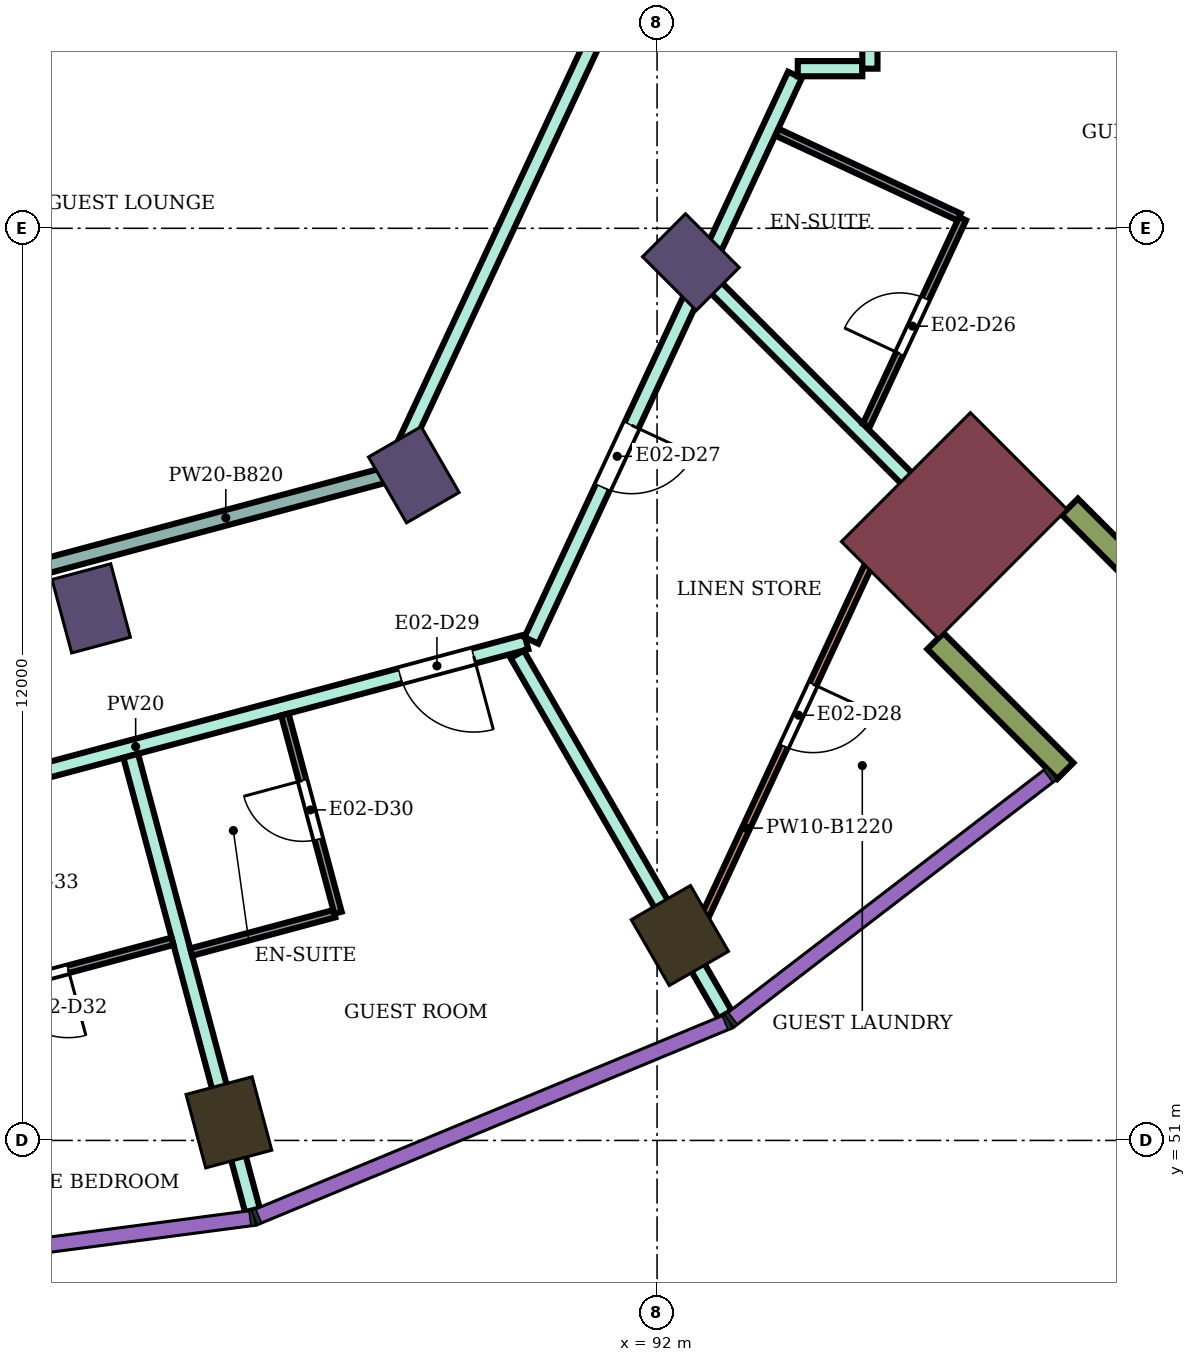
"""IFC4 building model, lengths in metres.
Left out: names, types, materials, properties, quantities, classifications, styles, units other than length and angle.
Written with IfcOpenShell. Run it as: python <this file> out.ifc"""

import sys

from ifc_helpers import new_model, si_unit, direction, frame, frame_2d, origin, origin_2d, place, context, subcontext, project, spatial, rectangle, extrude, element, fill, save


model = new_model("IFC4")
c1 = context("Model", 3, precision=1e-05, world=origin(), true_north=direction((0.0, 1.0)))
c2 = subcontext(c1, "Body", "Model", "MODEL_VIEW")
j1 = project(units=[si_unit("LENGTHUNIT", "METRE"), si_unit("PLANEANGLEUNIT", "RADIAN")], contexts=[c1])
p1 = place(None, origin())
s1 = spatial("IfcSite", under=j1, at=p1, CompositionType="ELEMENT")
p2 = place(p1, origin())
s2 = spatial("IfcBuilding", under=s1, at=p2, CompositionType="ELEMENT")
p3 = place(p2, frame((0.0, 0.0, 126.3)))
s3 = spatial("IfcBuildingStorey", under=s2, at=p3, CompositionType="ELEMENT", Elevation=126.3)
for number, where, z_axis, x_axis in (
    (1, (86.367, 51.238, 0.0), (0.0, 0.0, 1.0), (0.259, -0.966, 0.0)),
    (2, (92.3, 53.696, 0.0), (0.0, 0.0, 1.0), (0.5, -0.866, 0.0)),
):
    element("IfcColumn", number, at=place(p3, frame(where, z_axis=z_axis, x_axis=x_axis)), inside=s3, PredefinedType="COLUMN", context=c2, shape_type="SweptSolid", body=[
        extrude(rectangle(XDim=1.0, YDim=0.9, at=origin_2d()), origin(), (0.0, 0.0, 1.0), 3.9),
    ])
for number, where, z_axis, x_axis in (
    (3, (84.555, 58.0, 0.0), (0.0, 0.0, 1.0), (0.259, -0.966, 0.0)),
    (4, (88.8, 59.758, 0.0), (0.0, 0.0, 1.0), (0.5, -0.866, 0.0)),
    (5, (92.445, 62.555, 0.0), (0.0, 0.0, 1.0), (0.707, -0.707, 0.0)),
):
    element("IfcColumn", number, at=place(p3, frame(where, z_axis=z_axis, x_axis=x_axis)), inside=s3, PredefinedType="COLUMN", context=c2, shape_type="SweptSolid", body=[
        extrude(rectangle(XDim=1.0, YDim=0.8, at=origin_2d()), origin(), (0.0, 0.0, 1.0), 3.9),
    ])
p4 = place(p3, frame((95.91, 59.09, 0.0), z_axis=(0.0, 0.0, 1.0), x_axis=(0.707106781187, -0.707106781187, 0.0)))
e6 = element("IfcColumn", 6, at=p4, inside=s3, PredefinedType="COLUMN", context=c2, shape_type="SweptSolid", body=[
    extrude(rectangle(XDim=1.8, YDim=2.4, at=origin_2d()), origin(), (0.0, 0.0, 1.0), 3.9),
])
for number, where, z_axis, x_axis in (
    (7, (95.662, 57.57, 0.0), (0.0, 0.0, 1.0), (0.707, -0.707, 0.0)),
    (8, (97.43, 59.338, 0.0), (0.0, 0.0, 1.0), (0.707, -0.707, 0.0)),
):
    element("IfcWall", number, at=place(p3, frame(where, z_axis=z_axis, x_axis=x_axis)), inside=s3, PredefinedType="NOTDEFINED", context=c2, shape_type="SweptSolid", body=[
        extrude(rectangle(XDim=2.416, YDim=0.3, at=frame_2d((1.208, 0.0))), origin(), (0.0, 0.0, 1.0), 3.9),
    ])
p5 = place(p3, frame((80.0, 54.805, 0.0), z_axis=(0.0, 0.0, 1.0), x_axis=(0.965967909695, 0.258661936588, 0.0)))
e9 = element("IfcWall", 9, at=p5, inside=s3, PredefinedType="PARTITIONING", context=c2, shape_type="SweptSolid", body=[
    extrude(rectangle(XDim=10.643, YDim=0.2, at=frame_2d((5.322, 0.0))), origin(), (0.0, 0.0, 1.0), 3.45),
])
p6 = place(p5, frame((8.925, 0.0, 0.0)))
e10 = element("IfcOpeningElement", 10, at=p6, cuts=e9, PredefinedType="OPENING", context=c2, shape_type="SweptSolid", body=[
    extrude(rectangle(XDim=1.0, YDim=2.1, at=frame_2d((0.5, 1.05))), frame((0.0, 0.11, 0.0), z_axis=(0.0, -1.0, 0.0), x_axis=(1.0, 0.0, 0.0)), (0.0, 0.0, 1.0), 0.22),
])
p7 = place(p5, frame((2.123, 0.0, 0.0)))
e11 = element("IfcOpeningElement", 11, at=p7, cuts=e9, PredefinedType="OPENING", context=c2, shape_type="SweptSolid", body=[
    extrude(rectangle(XDim=1.0, YDim=2.1, at=frame_2d((0.5, 1.05))), frame((0.0, 0.11, 0.0), z_axis=(0.0, -1.0, 0.0), x_axis=(1.0, 0.0, 0.0)), (0.0, 0.0, 1.0), 0.22),
])
p8 = place(p3, frame((80.001, 57.496, 0.0), z_axis=(0.0, 0.0, 1.0), x_axis=(0.965924211089, 0.258825073035, 0.0)))
e12 = element("IfcWall", 12, at=p8, inside=s3, PredefinedType="PARTITIONING", context=c2, shape_type="SweptSolid", body=[
    extrude(rectangle(XDim=8.731, YDim=0.2, at=frame_2d((4.365, 0.0))), origin(), (0.0, 0.0, 1.0), 3.08),
])
p9 = place(p8, frame((2.3, 0.0, 0.0)))
e13 = element("IfcOpeningElement", 13, at=p9, cuts=e12, PredefinedType="OPENING", context=c2, shape_type="SweptSolid", body=[
    extrude(rectangle(XDim=1.8, YDim=2.1, at=frame_2d((0.9, 1.05))), frame((0.0, 0.11, 0.0), z_axis=(0.0, -1.0, 0.0), x_axis=(1.0, 0.0, 0.0)), (0.0, 0.0, 1.0), 0.22),
])
p10 = place(p3, frame((85.075, 56.061, 0.0), z_axis=(0.0, 0.0, 1.0), x_axis=(0.258703231129, -0.965956851109, 0.0)))
e14 = element("IfcWall", 14, at=p10, inside=s3, PredefinedType="PARTITIONING", context=c2, shape_type="SweptSolid", body=[
    extrude(rectangle(XDim=6.191, YDim=0.2, at=frame_2d((3.095, 0.0))), origin(), (0.0, 0.0, 1.0), 3.45),
])
p11 = place(p3, frame((88.502, 59.774, 0.0), z_axis=(0.0, 0.0, 1.0), x_axis=(0.423423307095, 0.905931952747, 0.0)))
e15 = element("IfcWall", 15, at=p11, inside=s3, PredefinedType="PARTITIONING", context=c2, shape_type="SweptSolid", body=[
    extrude(rectangle(XDim=7.529, YDim=0.2, at=frame_2d((3.764, 0.0))), origin(), (0.0, 0.0, 1.0), 3.45),
])
p12 = place(p3, frame((90.16, 57.396, 0.0), z_axis=(0.0, 0.0, 1.0), x_axis=(0.499848624781, -0.86611278267, 0.0)))
e16 = element("IfcWall", 16, at=p12, inside=s3, PredefinedType="PARTITIONING", context=c2, shape_type="SweptSolid", body=[
    extrude(rectangle(XDim=5.472, YDim=0.2, at=frame_2d((2.736, 0.0))), origin(), (0.0, 0.0, 1.0), 3.45),
])
p13 = place(p3, frame((90.346, 57.578, 0.0), z_axis=(0.0, 0.0, 1.0), x_axis=(0.422476720533, 0.906373775331, 0.0)))
e17 = element("IfcWall", 17, at=p13, inside=s3, PredefinedType="PARTITIONING", context=c2, shape_type="SweptSolid", body=[
    extrude(rectangle(XDim=8.208, YDim=0.2, at=frame_2d((4.104, 0.0))), origin(), (0.0, 0.0, 1.0), 3.45),
])
p14 = place(p13, frame((2.223, 0.0, 0.0)))
e18 = element("IfcOpeningElement", 18, at=p14, cuts=e17, PredefinedType="OPENING", context=c2, shape_type="SweptSolid", body=[
    extrude(rectangle(XDim=0.9, YDim=2.1, at=frame_2d((0.45, 1.05))), frame((0.0, 0.11, 0.0), z_axis=(0.0, -1.0, 0.0), x_axis=(1.0, 0.0, 0.0)), (0.0, 0.0, 1.0), 0.22),
])
p15 = place(p3, frame((92.692, 62.303, 0.0), z_axis=(0.0, 0.0, 1.0), x_axis=(0.706943936447, -0.707269588432, 0.0)))
e19 = element("IfcWall", 19, at=p15, inside=s3, PredefinedType="PARTITIONING", context=c2, shape_type="SweptSolid", body=[
    extrude(rectangle(XDim=5.248, YDim=0.2, at=frame_2d((2.624, 0.0))), origin(), (0.0, 0.0, 1.0), 3.45),
])
p16 = place(p3, frame((93.851, 65.1, 0.0), z_axis=(0.0, 0.0, 1.0), x_axis=(1.0, 0.0, 0.0)))
e20 = element("IfcWall", 20, at=p16, inside=s3, PredefinedType="PARTITIONING", context=c2, shape_type="SweptSolid", body=[
    extrude(rectangle(XDim=0.849, YDim=0.2, at=frame_2d((0.424, 0.0))), origin(), (0.0, 0.0, 1.0), 3.45),
])
p17 = place(p3, frame((94.8, 65.1, 0.0), z_axis=(0.0, 0.0, 1.0), x_axis=(0.0, 1.0, 0.0)))
e21 = element("IfcWall", 21, at=p17, inside=s3, PredefinedType="PARTITIONING", context=c2, shape_type="SweptSolid", body=[
    extrude(rectangle(XDim=1.499, YDim=0.2, at=frame_2d((0.75, 0.0))), origin(), (0.0, 0.0, 1.0), 3.45),
])
p18 = place(p17, frame((0.25, 0.0, 0.0)))
e22 = element("IfcOpeningElement", 22, at=p18, cuts=e21, PredefinedType="OPENING", context=c2, shape_type="SweptSolid", body=[
    extrude(rectangle(XDim=1.0, YDim=2.1, at=frame_2d((0.5, 1.05))), frame((0.0, 0.11, 0.0), z_axis=(0.0, -1.0, 0.0), x_axis=(1.0, 0.0, 0.0)), (0.0, 0.0, 1.0), 0.22),
])
p19 = place(p3, frame((80.106, 52.14, 0.0), z_axis=(0.0, 0.0, 1.0), x_axis=(0.965888724411, 0.25895747152, 0.0)))
e23 = element("IfcWall", 23, at=p19, inside=s3, PredefinedType="PARTITIONING", context=c2, shape_type="SweptSolid", body=[
    extrude(rectangle(XDim=5.714, YDim=0.1, at=frame_2d((2.857, 0.0))), origin(), (0.0, 0.0, 1.0), 3.45),
])
p20 = place(p19, frame((3.392, 0.0, 0.0)))
e24 = element("IfcOpeningElement", 24, at=p20, cuts=e23, PredefinedType="OPENING", context=c2, shape_type="SweptSolid", body=[
    extrude(rectangle(XDim=0.9, YDim=2.1, at=frame_2d((0.45, 1.05))), frame((0.0, 0.06, 0.0), z_axis=(0.0, -1.0, 0.0), x_axis=(1.0, 0.0, 0.0)), (0.0, 0.0, 1.0), 0.12),
])
p21 = place(p3, frame((85.871, 53.478, 0.0), z_axis=(0.0, 0.0, 1.0), x_axis=(0.965853538138, 0.25908867761, 0.0)))
e25 = element("IfcWall", 25, at=p21, inside=s3, PredefinedType="PARTITIONING", context=c2, shape_type="SweptSolid", body=[
    extrude(rectangle(XDim=1.95, YDim=0.1, at=frame_2d((0.975, 0.0))), origin(), (0.0, 0.0, 1.0), 3.45),
])
p22 = place(p3, frame((87.103, 56.604, 0.0), z_axis=(0.0, 0.0, 1.0), x_axis=(0.258883730688, -0.965908491517, 0.0)))
e26 = element("IfcWall", 26, at=p22, inside=s3, PredefinedType="PARTITIONING", context=c2, shape_type="SweptSolid", body=[
    extrude(rectangle(XDim=2.7, YDim=0.1, at=frame_2d((1.35, 0.0))), origin(), (0.0, 0.0, 1.0), 3.45),
])
p23 = place(p22, frame((0.9, 0.0, 0.0)))
e27 = element("IfcOpeningElement", 27, at=p23, cuts=e26, PredefinedType="OPENING", context=c2, shape_type="SweptSolid", body=[
    extrude(rectangle(XDim=0.8, YDim=2.1, at=frame_2d((0.4, 1.05))), frame((0.0, 0.06, 0.0), z_axis=(0.0, -1.0, 0.0), x_axis=(1.0, 0.0, 0.0)), (0.0, 0.0, 1.0), 0.12),
])
p24 = place(p3, frame((92.477, 53.619, 0.0), z_axis=(0.0, 0.0, 1.0), x_axis=(0.421913254756, 0.90663620348, 0.0)))
e28 = element("IfcWall", 28, at=p24, inside=s3, PredefinedType="PARTITIONING", context=c2, shape_type="SweptSolid", body=[
    extrude(rectangle(XDim=6.573, YDim=0.1, at=frame_2d((3.287, 0.0))), origin(), (0.0, 0.0, 1.0), 2.68),
])
p25 = place(p24, frame((2.831, 0.0, 0.0)))
e29 = element("IfcOpeningElement", 29, at=p25, cuts=e28, PredefinedType="OPENING", context=c2, shape_type="SweptSolid", body=[
    extrude(rectangle(XDim=0.9, YDim=2.1, at=frame_2d((0.45, 1.05))), frame((0.0, 0.06, 0.0), z_axis=(0.0, -1.0, 0.0), x_axis=(1.0, 0.0, 0.0)), (0.0, 0.0, 1.0), 0.12),
])
p26 = place(p3, frame((93.582, 64.263, 0.0), z_axis=(0.0, 0.0, 1.0), x_axis=(0.906494794209, -0.422216991691, 0.0)))
e30 = element("IfcWall", 30, at=p26, inside=s3, PredefinedType="PARTITIONING", context=c2, shape_type="SweptSolid", body=[
    extrude(rectangle(XDim=2.64, YDim=0.1, at=frame_2d((1.32, 0.0))), origin(), (0.0, 0.0, 1.0), 3.45),
])
p27 = place(p3, frame((94.753, 60.408, 0.0), z_axis=(0.0, 0.0, 1.0), x_axis=(0.422435455794, 0.906393008406, 0.0)))
e31 = element("IfcWall", 31, at=p27, inside=s3, PredefinedType="PARTITIONING", context=c2, shape_type="SweptSolid", body=[
    extrude(rectangle(XDim=3.0, YDim=0.1, at=frame_2d((1.5, 0.0))), origin(), (0.0, 0.0, 1.0), 3.45),
])
p28 = place(p27, frame((1.04, 0.0, 0.0)))
e32 = element("IfcOpeningElement", 32, at=p28, cuts=e31, PredefinedType="OPENING", context=c2, shape_type="SweptSolid", body=[
    extrude(rectangle(XDim=0.8, YDim=2.1, at=frame_2d((0.4, 1.05))), frame((0.0, 0.06, 0.0), z_axis=(0.0, -1.0, 0.0), x_axis=(1.0, 0.0, 0.0)), (0.0, 0.0, 1.0), 0.12),
])
p29 = place(p28, origin())
e33 = element("IfcDoor", 33, at=p29, inside=s3, OperationType="SINGLE_SWING_LEFT", PredefinedType="DOOR", context=c2, shape_type="SweptSolid", body=[
    extrude(rectangle(XDim=0.8, YDim=2.1, at=frame_2d((0.4, 1.05))), frame((0.0, 0.025, 0.0), z_axis=(0.0, -1.0, 0.0), x_axis=(1.0, 0.0, 0.0)), (0.0, 0.0, 1.0), 0.05),
])
fill(e32, e33)
p30 = place(p14, frame((0.9, 0.0, 0.0), z_axis=(0.0, 0.0, 1.0), x_axis=(-1.0, 0.0, 0.0)))
e34 = element("IfcDoor", 34, at=p30, inside=s3, OperationType="SINGLE_SWING_LEFT", PredefinedType="DOOR", context=c2, shape_type="SweptSolid", body=[
    extrude(rectangle(XDim=0.9, YDim=2.1, at=frame_2d((0.45, 1.05))), frame((0.0, 0.025, 0.0), z_axis=(0.0, -1.0, 0.0), x_axis=(1.0, 0.0, 0.0)), (0.0, 0.0, 1.0), 0.05),
])
fill(e18, e34)
p31 = place(p25, frame((0.9, 0.0, 0.0), z_axis=(0.0, 0.0, 1.0), x_axis=(-1.0, 0.0, 0.0)))
e35 = element("IfcDoor", 35, at=p31, inside=s3, OperationType="SINGLE_SWING_LEFT", PredefinedType="DOOR", context=c2, shape_type="SweptSolid", body=[
    extrude(rectangle(XDim=0.9, YDim=2.1, at=frame_2d((0.45, 1.05))), frame((0.0, 0.025, 0.0), z_axis=(0.0, -1.0, 0.0), x_axis=(1.0, 0.0, 0.0)), (0.0, 0.0, 1.0), 0.05),
])
fill(e29, e35)
p32 = place(p6, frame((1.0, 0.0, 0.0), z_axis=(0.0, 0.0, 1.0), x_axis=(-1.0, 0.0, 0.0)))
e36 = element("IfcDoor", 36, at=p32, inside=s3, OperationType="SINGLE_SWING_LEFT", PredefinedType="DOOR", context=c2, shape_type="SweptSolid", body=[
    extrude(rectangle(XDim=1.0, YDim=2.1, at=frame_2d((0.5, 1.05))), frame((0.0, 0.025, 0.0), z_axis=(0.0, -1.0, 0.0), x_axis=(1.0, 0.0, 0.0)), (0.0, 0.0, 1.0), 0.05),
])
fill(e10, e36)
p33 = place(p23, frame((0.8, 0.0, 0.0), z_axis=(0.0, 0.0, 1.0), x_axis=(-1.0, 0.0, 0.0)))
e37 = element("IfcDoor", 37, at=p33, inside=s3, OperationType="SINGLE_SWING_RIGHT", PredefinedType="DOOR", context=c2, shape_type="SweptSolid", body=[
    extrude(rectangle(XDim=0.8, YDim=2.1, at=frame_2d((0.4, 1.05))), frame((0.0, 0.025, 0.0), z_axis=(0.0, -1.0, 0.0), x_axis=(1.0, 0.0, 0.0)), (0.0, 0.0, 1.0), 0.05),
])
fill(e27, e37)
p34 = place(p20, frame((0.9, 0.0, 0.0), z_axis=(0.0, 0.0, 1.0), x_axis=(-1.0, 0.0, 0.0)))
e38 = element("IfcDoor", 38, at=p34, inside=s3, OperationType="SINGLE_SWING_LEFT", PredefinedType="DOOR", context=c2, shape_type="SweptSolid", body=[
    extrude(rectangle(XDim=0.9, YDim=2.1, at=frame_2d((0.45, 1.05))), frame((0.0, 0.025, 0.0), z_axis=(0.0, -1.0, 0.0), x_axis=(1.0, 0.0, 0.0)), (0.0, 0.0, 1.0), 0.05),
])
fill(e24, e38)
save(model, sys.argv[1])
